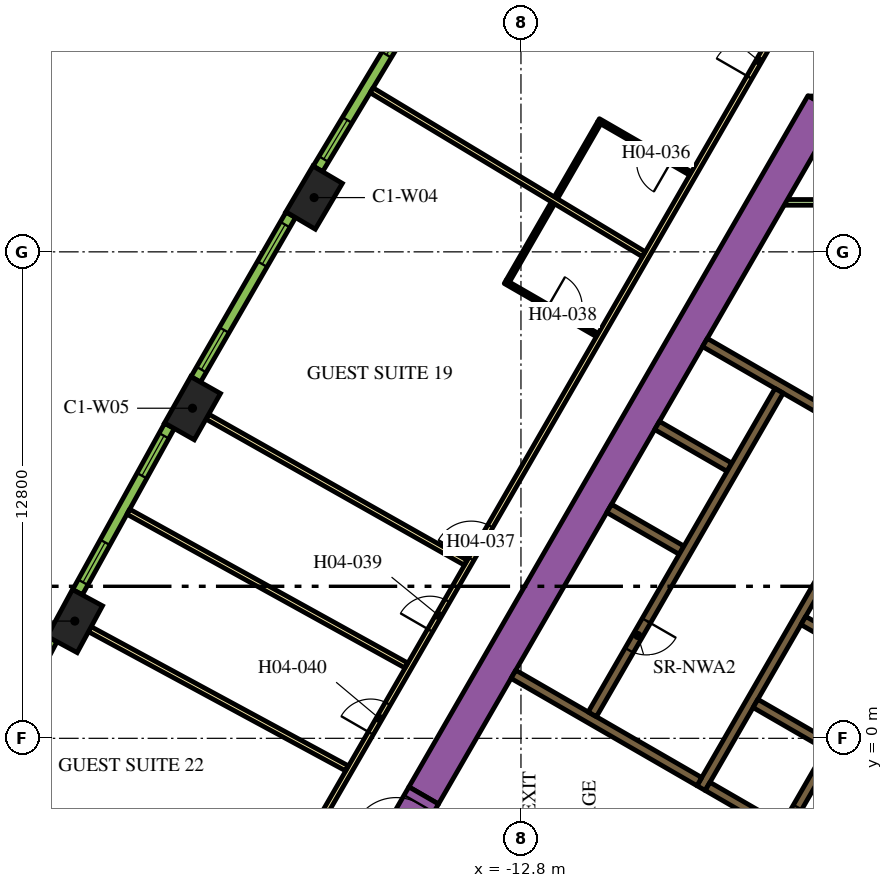
"""IFC4 building model, lengths in metres.
Left out: names, types, materials, properties, quantities, classifications, styles, units other than length and angle.
Written with IfcOpenShell. Run it as: python <this file> out.ifc"""

import sys

from ifc_helpers import new_model, si_unit, direction, frame, frame_2d, origin, origin_2d, place, context, subcontext, project, spatial, polyline, rectangle, outline, extrude, element, fill, save


model = new_model("IFC4")
c1 = context("Model", 3, precision=1e-05, world=origin(), true_north=direction((0.0, 1.0)))
c2 = subcontext(c1, "Body", "Model", "MODEL_VIEW")
j1 = project(units=[si_unit("LENGTHUNIT", "METRE"), si_unit("PLANEANGLEUNIT", "RADIAN")], contexts=[c1])
p1 = place(None, origin())
s1 = spatial("IfcSite", under=j1, at=p1, CompositionType="ELEMENT")
p2 = place(p1, origin())
s2 = spatial("IfcBuilding", under=s1, at=p2, CompositionType="ELEMENT")
p3 = place(p2, frame((0.0, 0.0, 66.6)))
s3 = spatial("IfcBuildingStorey", under=s2, at=p3, CompositionType="ELEMENT", Elevation=66.6)
for number, where, z_axis, x_axis in (
    (1, (-18.243, 14.228, 0.0), (0.0, 0.0, 1.0), (-0.508, -0.861, 0.0)),
    (2, (-21.443, 8.685, 0.0), (0.0, 0.0, 1.0), (-0.492, -0.871, 0.0)),
    (3, (-24.54, 3.085, 0.0), (0.0, 0.0, 1.0), (-0.476, -0.88, 0.0)),
):
    element("IfcColumn", number, at=place(p3, frame(where, z_axis=z_axis, x_axis=x_axis)), inside=s3, PredefinedType="COLUMN", context=c2, shape_type="SweptSolid", body=[
        extrude(rectangle(XDim=1.4, YDim=0.9, at=origin_2d()), origin(), (0.0, 0.0, 1.0), 3.9),
    ])
p4 = place(p3, frame((-15.36, -1.503, 0.0), z_axis=(0.0, 0.0, 1.0), x_axis=(0.50000389221, 0.866023156604, 0.0)))
e4 = element("IfcWall", 4, at=p4, inside=s3, PredefinedType="SOLIDWALL", context=c2, shape_type="SweptSolid", body=[
    extrude(rectangle(XDim=21.0, YDim=0.9, at=frame_2d((10.5, 0.0))), origin(), (0.0, 0.0, 1.0), 3.9),
])
p5 = place(p3, origin())
e5 = element("IfcWall", 5, at=p5, inside=s3, PredefinedType="SOLIDWALL", context=c2, shape_type="SweptSolid", body=[
    extrude(outline(polyline([(-4.215, 16.9), (-4.469, 16.46), (-5.231, 16.9), (-4.215, 16.9)])), origin(), (0.0, 0.0, 1.0), 3.9),
])
p6 = place(p3, frame((-8.06, -1.311, 0.0), z_axis=(0.0, 0.0, 1.0), x_axis=(0.50000273126, 0.866023826885, 0.0)))
e6 = element("IfcWall", 6, at=p6, inside=s3, PredefinedType="SOLIDWALL", context=c2, shape_type="SweptSolid", body=[
    extrude(rectangle(XDim=10.33, YDim=0.25, at=frame_2d((5.165, 0.0))), origin(), (0.0, 0.0, 1.0), 3.9),
])
for number, where, z_axis, x_axis in (
    (7, (-5.369, 3.1, 0.0), (0.0, 0.0, 1.0), (0.866, -0.5, 0.0)),
    (8, (-4.724, -0.182, 0.0), (0.0, 0.0, 1.0), (-0.866, 0.5, 0.0)),
):
    element("IfcWall", number, at=place(p3, frame(where, z_axis=z_axis, x_axis=x_axis)), inside=s3, PredefinedType="SOLIDWALL", context=c2, shape_type="SweptSolid", body=[
        extrude(rectangle(XDim=2.2, YDim=0.25, at=frame_2d((1.1, 0.0))), origin(), (0.0, 0.0, 1.0), 3.9),
    ])
p7 = place(p3, frame((-7.889, -1.265, 0.0), z_axis=(0.0, 0.0, 1.0), x_axis=(0.865986741702, -0.500066958712, 0.0)))
e9 = element("IfcWall", 9, at=p7, inside=s3, PredefinedType="SOLIDWALL", context=c2, shape_type="SweptSolid", body=[
    extrude(rectangle(XDim=1.738, YDim=0.25, at=frame_2d((0.869, 0.0))), origin(), (0.0, 0.0, 1.0), 3.9),
])
p8 = place(p3, frame((-8.106, -1.14, 0.0), z_axis=(0.0, 0.0, 1.0), x_axis=(-0.866000643155, 0.500042884217, 0.0)))
e10 = element("IfcWall", 10, at=p8, inside=s3, PredefinedType="SOLIDWALL", context=c2, shape_type="SweptSolid", body=[
    extrude(rectangle(XDim=5.65, YDim=0.25, at=frame_2d((2.825, 0.0))), origin(), (0.0, 0.0, 1.0), 3.9),
])
for number, where, z_axis, x_axis in (
    (11, (-8.574, 4.95, 0.0), (0.0, 0.0, 1.0), (-0.866, 0.5, 0.0)),
    (12, (-7.314, 7.132, 0.0), (0.0, 0.0, 1.0), (-0.866, 0.5, 0.0)),
):
    element("IfcWall", number, at=place(p3, frame(where, z_axis=z_axis, x_axis=x_axis)), inside=s3, PredefinedType="SOLIDWALL", context=c2, shape_type="SweptSolid", body=[
        extrude(rectangle(XDim=2.2, YDim=0.25, at=frame_2d((1.1, 0.0))), origin(), (0.0, 0.0, 1.0), 3.9),
    ])
p9 = place(p3, frame((-7.959, 10.415, 0.0), z_axis=(0.0, 0.0, 1.0), x_axis=(0.866020958405, -0.500007699544, 0.0)))
e13 = element("IfcWall", 13, at=p9, inside=s3, PredefinedType="SOLIDWALL", context=c2, shape_type="SweptSolid", body=[
    extrude(rectangle(XDim=4.1, YDim=0.25, at=frame_2d((2.05, 0.0))), origin(), (0.0, 0.0, 1.0), 3.9),
])
p10 = place(p3, frame((-5.851, 14.102, 0.0), z_axis=(0.0, 0.0, 1.0), x_axis=(1.0, 0.0, 0.0)))
e14 = element("IfcWall", 14, at=p10, inside=s3, PredefinedType="PARTITIONING", context=c2, shape_type="SweptSolid", body=[
    extrude(rectangle(XDim=1.18, YDim=0.15, at=frame_2d((0.59, 0.0))), origin(), (0.0, 0.0, 1.0), 2.75),
])
p11 = place(p3, frame((-6.008, 9.144, 0.0), z_axis=(0.0, 0.0, 1.0), x_axis=(-0.500006956611, -0.866021387346, 0.0)))
e15 = element("IfcWall", 15, at=p11, inside=s3, PredefinedType="SOLIDWALL", context=c2, shape_type="SweptSolid", body=[
    extrude(rectangle(XDim=9.83, YDim=0.25, at=frame_2d((4.915, 0.0))), origin(), (0.0, 0.0, 1.0), 3.9),
])
p12 = place(p11, frame((6.985, 0.0, 0.0)))
e16 = element("IfcOpeningElement", 16, at=p12, cuts=e15, PredefinedType="OPENING", context=c2, shape_type="SweptSolid", body=[
    extrude(rectangle(XDim=0.9, YDim=2.1, at=frame_2d((0.45, 1.05))), frame((0.0, 0.135, 0.0), z_axis=(0.0, -1.0, 0.0), x_axis=(1.0, 0.0, 0.0)), (0.0, 0.0, 1.0), 0.27),
])
p13 = place(p3, frame((-0.898, 6.194, 0.0), z_axis=(0.0, 0.0, 1.0), x_axis=(-0.499996202215, -0.866027596426, 0.0)))
e17 = element("IfcWall", 17, at=p13, inside=s3, PredefinedType="SOLIDWALL", context=c2, shape_type="SweptSolid", body=[
    extrude(rectangle(XDim=9.83, YDim=0.25, at=frame_2d((4.915, 0.0))), origin(), (0.0, 0.0, 1.0), 3.9),
])
p14 = place(p13, frame((0.585, 0.0, 0.0)))
e18 = element("IfcOpeningElement", 18, at=p14, cuts=e17, PredefinedType="OPENING", context=c2, shape_type="SweptSolid", body=[
    extrude(rectangle(XDim=1.1, YDim=2.1, at=frame_2d((0.55, 1.05))), frame((0.0, 0.135, 0.0), z_axis=(0.0, -1.0, 0.0), x_axis=(1.0, 0.0, 0.0)), (0.0, 0.0, 1.0), 0.27),
])
p15 = place(p13, frame((3.105, 0.0, 0.0)))
e19 = element("IfcOpeningElement", 19, at=p15, cuts=e17, PredefinedType="OPENING", context=c2, shape_type="SweptSolid", body=[
    extrude(rectangle(XDim=1.1, YDim=2.1, at=frame_2d((0.55, 1.05))), frame((0.0, 0.135, 0.0), z_axis=(0.0, -1.0, 0.0), x_axis=(1.0, 0.0, 0.0)), (0.0, 0.0, 1.0), 0.27),
])
p16 = place(p13, frame((5.625, 0.0, 0.0)))
e20 = element("IfcOpeningElement", 20, at=p16, cuts=e17, PredefinedType="OPENING", context=c2, shape_type="SweptSolid", body=[
    extrude(rectangle(XDim=1.1, YDim=2.1, at=frame_2d((0.55, 1.05))), frame((0.0, 0.135, 0.0), z_axis=(0.0, -1.0, 0.0), x_axis=(1.0, 0.0, 0.0)), (0.0, 0.0, 1.0), 0.27),
])
p17 = place(p13, frame((8.145, 0.0, 0.0)))
e21 = element("IfcOpeningElement", 21, at=p17, cuts=e17, PredefinedType="OPENING", context=c2, shape_type="SweptSolid", body=[
    extrude(rectangle(XDim=1.1, YDim=2.1, at=frame_2d((0.55, 1.05))), frame((0.0, 0.135, 0.0), z_axis=(0.0, -1.0, 0.0), x_axis=(1.0, 0.0, 0.0)), (0.0, 0.0, 1.0), 0.27),
])
p18 = place(p3, frame((-16.209, -2.976, 0.0), z_axis=(0.0, 0.0, 1.0), x_axis=(0.499954529098, 0.86605165483, 0.0)))
e22 = element("IfcWall", 22, at=p18, inside=s3, PredefinedType="SOLIDWALL", context=c2, shape_type="SweptSolid", body=[
    extrude(rectangle(XDim=1.7, YDim=0.9, at=frame_2d((0.85, 0.0))), origin(), (0.0, 0.0, 1.0), 3.9),
])
p19 = place(p18, frame((0.25, 0.0, 0.0)))
e23 = element("IfcOpeningElement", 23, at=p19, cuts=e22, PredefinedType="OPENING", context=c2, shape_type="SweptSolid", body=[
    extrude(rectangle(XDim=1.2, YDim=2.1, at=frame_2d((0.6, 1.05))), frame((0.0, 0.46, 0.0), z_axis=(0.0, -1.0, 0.0), x_axis=(1.0, 0.0, 0.0)), (0.0, 0.0, 1.0), 0.92),
])
p20 = place(p3, frame((-19.081, -3.9, 0.0), z_axis=(0.0, 0.0, 1.0), x_axis=(0.499998313975, 0.866026377209, 0.0)))
e24 = element("IfcWall", 24, at=p20, inside=s3, PredefinedType="PARTITIONING", context=c2, shape_type="SweptSolid", body=[
    extrude(rectangle(XDim=25.766, YDim=0.15, at=frame_2d((12.883, 0.0))), origin(), (0.0, 0.0, 1.0), 2.75),
])
p21 = place(p20, frame((24.586, 0.0, 0.0)))
e25 = element("IfcOpeningElement", 25, at=p21, cuts=e24, PredefinedType="OPENING", context=c2, shape_type="SweptSolid", body=[
    extrude(rectangle(XDim=1.0, YDim=2.1, at=frame_2d((0.5, 1.05))), frame((0.0, 0.085, 0.0), z_axis=(0.0, -1.0, 0.0), x_axis=(1.0, 0.0, 0.0)), (0.0, 0.0, 1.0), 0.17),
])
p22 = place(p20, frame((9.948, 0.0, 0.0)))
e26 = element("IfcOpeningElement", 26, at=p22, cuts=e24, PredefinedType="OPENING", context=c2, shape_type="SweptSolid", body=[
    extrude(rectangle(XDim=1.0, YDim=2.1, at=frame_2d((0.5, 1.05))), frame((0.0, 0.085, 0.0), z_axis=(0.0, -1.0, 0.0), x_axis=(1.0, 0.0, 0.0)), (0.0, 0.0, 1.0), 0.17),
])
p23 = place(p20, frame((7.782, 0.0, 0.0)))
e27 = element("IfcOpeningElement", 27, at=p23, cuts=e24, PredefinedType="OPENING", context=c2, shape_type="SweptSolid", body=[
    extrude(rectangle(XDim=0.9, YDim=2.1, at=frame_2d((0.45, 1.05))), frame((0.0, 0.085, 0.0), z_axis=(0.0, -1.0, 0.0), x_axis=(1.0, 0.0, 0.0)), (0.0, 0.0, 1.0), 0.17),
])
p24 = place(p20, frame((4.658, 0.0, 0.0)))
e28 = element("IfcOpeningElement", 28, at=p24, cuts=e24, PredefinedType="OPENING", context=c2, shape_type="SweptSolid", body=[
    extrude(rectangle(XDim=0.9, YDim=2.1, at=frame_2d((0.45, 1.05))), frame((0.0, 0.085, 0.0), z_axis=(0.0, -1.0, 0.0), x_axis=(1.0, 0.0, 0.0)), (0.0, 0.0, 1.0), 0.17),
])
p25 = place(p3, frame((-24.145, 2.871, 0.0), z_axis=(0.0, 0.0, 1.0), x_axis=(0.879551725039, -0.475803281809, 0.0)))
e29 = element("IfcWall", 29, at=p25, inside=s3, PredefinedType="PARTITIONING", context=c2, shape_type="SweptSolid", body=[
    extrude(rectangle(XDim=7.688, YDim=0.15, at=frame_2d((3.844, 0.0))), origin(), (0.0, 0.0, 1.0), 2.75),
])
p26 = place(p3, frame((-23.132, 5.962, 0.0), z_axis=(0.0, 0.0, 1.0), x_axis=(0.875121716713, -0.483902863121, 0.0)))
e30 = element("IfcWall", 30, at=p26, inside=s3, PredefinedType="PARTITIONING", context=c2, shape_type="SweptSolid", body=[
    extrude(rectangle(XDim=8.355, YDim=0.15, at=frame_2d((4.178, 0.0))), origin(), (0.0, 0.0, 1.0), 2.75),
])
p27 = place(p3, frame((-21.052, 8.464, 0.0), z_axis=(0.0, 0.0, 1.0), x_axis=(0.87059371954, -0.492002617368, 0.0)))
e31 = element("IfcWall", 31, at=p27, inside=s3, PredefinedType="PARTITIONING", context=c2, shape_type="SweptSolid", body=[
    extrude(rectangle(XDim=7.803, YDim=0.15, at=frame_2d((3.902, 0.0))), origin(), (0.0, 0.0, 1.0), 2.75),
])
p28 = place(p3, frame((-16.729, 17.052, 0.0), z_axis=(0.0, 0.0, 1.0), x_axis=(0.856630606266, -0.515930232113, 0.0)))
e32 = element("IfcWall", 32, at=p28, inside=s3, PredefinedType="PARTITIONING", context=c2, shape_type="SweptSolid", body=[
    extrude(rectangle(XDim=8.355, YDim=0.15, at=frame_2d((4.178, 0.0))), origin(), (0.0, 0.0, 1.0), 2.75),
])
p29 = place(p3, frame((-8.337, 14.861, 0.0), z_axis=(0.0, 0.0, 1.0), x_axis=(-0.866034573852, 0.49998411664, 0.0)))
e33 = element("IfcWall", 33, at=p29, inside=s3, PredefinedType="PARTITIONING", context=c2, shape_type="SweptSolid", body=[
    extrude(rectangle(XDim=2.8, YDim=0.1, at=frame_2d((1.4, 0.0))), origin(), (0.0, 0.0, 1.0), 2.75),
])
p30 = place(p29, frame((0.6, 0.0, 0.0)))
e34 = element("IfcOpeningElement", 34, at=p30, cuts=e33, PredefinedType="OPENING", context=c2, shape_type="SweptSolid", body=[
    extrude(rectangle(XDim=0.9, YDim=2.1, at=frame_2d((0.45, 1.05))), frame((0.0, 0.06, 0.0), z_axis=(0.0, -1.0, 0.0), x_axis=(1.0, 0.0, 0.0)), (0.0, 0.0, 1.0), 0.12),
])
p31 = place(p3, frame((-10.743, 16.192, 0.0), z_axis=(0.0, 0.0, 1.0), x_axis=(-0.500014167291, -0.866017224141, 0.0)))
e35 = element("IfcWall", 35, at=p31, inside=s3, PredefinedType="PARTITIONING", context=c2, shape_type="SweptSolid", body=[
    extrude(rectangle(XDim=2.27, YDim=0.1, at=frame_2d((1.135, 0.0))), origin(), (0.0, 0.0, 1.0), 2.75),
])
p32 = place(p3, frame((-13.215, 12.011, 0.0), z_axis=(0.0, 0.0, 1.0), x_axis=(0.865996816683, -0.500049511043, 0.0)))
e36 = element("IfcWall", 36, at=p32, inside=s3, PredefinedType="PARTITIONING", context=c2, shape_type="SweptSolid", body=[
    extrude(rectangle(XDim=2.8, YDim=0.1, at=frame_2d((1.4, 0.0))), origin(), (0.0, 0.0, 1.0), 2.75),
])
p33 = place(p32, frame((1.3, 0.0, 0.0)))
e37 = element("IfcOpeningElement", 37, at=p33, cuts=e36, PredefinedType="OPENING", context=c2, shape_type="SweptSolid", body=[
    extrude(rectangle(XDim=0.9, YDim=2.1, at=frame_2d((0.45, 1.05))), frame((0.0, 0.06, 0.0), z_axis=(0.0, -1.0, 0.0), x_axis=(1.0, 0.0, 0.0)), (0.0, 0.0, 1.0), 0.12),
])
p34 = place(p3, frame((-13.147, 12.029, 0.0), z_axis=(0.0, 0.0, 1.0), x_axis=(0.499939447199, 0.866060361138, 0.0)))
e38 = element("IfcWall", 38, at=p34, inside=s3, PredefinedType="PARTITIONING", context=c2, shape_type="SweptSolid", body=[
    extrude(rectangle(XDim=2.37, YDim=0.1, at=frame_2d((1.185, 0.0))), origin(), (0.0, 0.0, 1.0), 2.75),
])
p35 = place(p3, frame((-15.564, 19.267, 0.0), z_axis=(0.0, 0.0, 1.0), x_axis=(-0.515938796285, -0.856625448191, 0.0)))
e39 = element("IfcWall", 39, at=p35, inside=s3, PredefinedType="SOLIDWALL", context=c2, shape_type="SweptSolid", body=[
    extrude(rectangle(XDim=4.998, YDim=0.29, at=frame_2d((2.499, 0.0))), origin(), (0.0, 0.0, 1.0), 3.65),
])
p36 = place(p35, frame((0.297, 0.0, 0.9)))
e40 = element("IfcOpeningElement", 40, at=p36, cuts=e39, PredefinedType="OPENING", context=c2, shape_type="SweptSolid", body=[
    extrude(rectangle(XDim=1.2, YDim=2.15, at=frame_2d((0.6, 1.075))), frame((0.0, 0.155, 0.0), z_axis=(0.0, -1.0, 0.0), x_axis=(1.0, 0.0, 0.0)), (0.0, 0.0, 1.0), 0.31),
])
p37 = place(p35, frame((3.501, 0.0, 0.9)))
e41 = element("IfcOpeningElement", 41, at=p37, cuts=e39, PredefinedType="OPENING", context=c2, shape_type="SweptSolid", body=[
    extrude(rectangle(XDim=1.2, YDim=2.15, at=frame_2d((0.6, 1.075))), frame((0.0, 0.155, 0.0), z_axis=(0.0, -1.0, 0.0), x_axis=(1.0, 0.0, 0.0)), (0.0, 0.0, 1.0), 0.31),
])
p38 = place(p3, frame((-18.858, 13.773, 0.0), z_axis=(0.0, 0.0, 1.0), x_axis=(-0.50002123722, -0.866013142123, 0.0)))
e42 = element("IfcWall", 42, at=p38, inside=s3, PredefinedType="SOLIDWALL", context=c2, shape_type="SweptSolid", body=[
    extrude(rectangle(XDim=4.998, YDim=0.29, at=frame_2d((2.499, 0.0))), origin(), (0.0, 0.0, 1.0), 3.65),
])
p39 = place(p38, frame((0.297, 0.0, 0.9)))
e43 = element("IfcOpeningElement", 43, at=p39, cuts=e42, PredefinedType="OPENING", context=c2, shape_type="SweptSolid", body=[
    extrude(rectangle(XDim=1.2, YDim=2.15, at=frame_2d((0.6, 1.075))), frame((0.0, 0.155, 0.0), z_axis=(0.0, -1.0, 0.0), x_axis=(1.0, 0.0, 0.0)), (0.0, 0.0, 1.0), 0.31),
])
p40 = place(p38, frame((3.501, 0.0, 0.9)))
e44 = element("IfcOpeningElement", 44, at=p40, cuts=e42, PredefinedType="OPENING", context=c2, shape_type="SweptSolid", body=[
    extrude(rectangle(XDim=1.2, YDim=2.15, at=frame_2d((0.6, 1.075))), frame((0.0, 0.155, 0.0), z_axis=(0.0, -1.0, 0.0), x_axis=(1.0, 0.0, 0.0)), (0.0, 0.0, 1.0), 0.31),
])
p41 = place(p3, frame((-22.05, 8.22, 0.0), z_axis=(0.0, 0.0, 1.0), x_axis=(-0.483912572871, -0.875116347589, 0.0)))
e45 = element("IfcWall", 45, at=p41, inside=s3, PredefinedType="SOLIDWALL", context=c2, shape_type="SweptSolid", body=[
    extrude(rectangle(XDim=4.998, YDim=0.29, at=frame_2d((2.499, 0.0))), origin(), (0.0, 0.0, 1.0), 3.65),
])
p42 = place(p41, frame((0.297, 0.0, 0.9)))
e46 = element("IfcOpeningElement", 46, at=p42, cuts=e45, PredefinedType="OPENING", context=c2, shape_type="SweptSolid", body=[
    extrude(rectangle(XDim=1.2, YDim=2.15, at=frame_2d((0.6, 1.075))), frame((0.0, 0.155, 0.0), z_axis=(0.0, -1.0, 0.0), x_axis=(1.0, 0.0, 0.0)), (0.0, 0.0, 1.0), 0.31),
])
p43 = place(p41, frame((3.501, 0.0, 0.9)))
e47 = element("IfcOpeningElement", 47, at=p43, cuts=e45, PredefinedType="OPENING", context=c2, shape_type="SweptSolid", body=[
    extrude(rectangle(XDim=1.2, YDim=2.15, at=frame_2d((0.6, 1.075))), frame((0.0, 0.155, 0.0), z_axis=(0.0, -1.0, 0.0), x_axis=(1.0, 0.0, 0.0)), (0.0, 0.0, 1.0), 0.31),
])
p44 = place(p3, frame((-25.138, 2.608, 0.0), z_axis=(0.0, 0.0, 1.0), x_axis=(-0.467629620899, -0.883924509026, 0.0)))
e48 = element("IfcWall", 48, at=p44, inside=s3, PredefinedType="SOLIDWALL", context=c2, shape_type="SweptSolid", body=[
    extrude(rectangle(XDim=4.998, YDim=0.29, at=frame_2d((2.499, 0.0))), origin(), (0.0, 0.0, 1.0), 3.65),
])
p45 = place(p44, frame((0.297, 0.0, 0.9)))
e49 = element("IfcOpeningElement", 49, at=p45, cuts=e48, PredefinedType="OPENING", context=c2, shape_type="SweptSolid", body=[
    extrude(rectangle(XDim=1.2, YDim=2.15, at=frame_2d((0.6, 1.075))), frame((0.0, 0.155, 0.0), z_axis=(0.0, -1.0, 0.0), x_axis=(1.0, 0.0, 0.0)), (0.0, 0.0, 1.0), 0.31),
])
p46 = place(p44, frame((3.501, 0.0, 0.9)))
e50 = element("IfcOpeningElement", 50, at=p46, cuts=e48, PredefinedType="OPENING", context=c2, shape_type="SweptSolid", body=[
    extrude(rectangle(XDim=1.2, YDim=2.15, at=frame_2d((0.6, 1.075))), frame((0.0, 0.155, 0.0), z_axis=(0.0, -1.0, 0.0), x_axis=(1.0, 0.0, 0.0)), (0.0, 0.0, 1.0), 0.31),
])
p47 = place(p12, origin())
e51 = element("IfcDoor", 51, at=p47, inside=s3, OperationType="SINGLE_SWING_LEFT", PredefinedType="DOOR", context=c2, shape_type="SweptSolid", body=[
    extrude(rectangle(XDim=0.9, YDim=2.1, at=frame_2d((0.45, 1.05))), frame((0.0, 0.025, 0.0), z_axis=(0.0, -1.0, 0.0), x_axis=(1.0, 0.0, 0.0)), (0.0, 0.0, 1.0), 0.05),
])
fill(e16, e51)
p48 = place(p17, origin())
e52 = element("IfcDoor", 52, at=p48, inside=s3, OperationType="DOUBLE_DOOR_SLIDING", PredefinedType="DOOR", context=c2, shape_type="SweptSolid", body=[
    extrude(rectangle(XDim=1.1, YDim=2.1, at=frame_2d((0.55, 1.05))), frame((0.0, 0.025, 0.0), z_axis=(0.0, -1.0, 0.0), x_axis=(1.0, 0.0, 0.0)), (0.0, 0.0, 1.0), 0.05),
])
fill(e21, e52)
p49 = place(p19, origin())
e53 = element("IfcDoor", 53, at=p49, inside=s3, OperationType="SINGLE_SWING_LEFT", PredefinedType="DOOR", context=c2, shape_type="SweptSolid", body=[
    extrude(rectangle(XDim=1.2, YDim=2.1, at=frame_2d((0.6, 1.05))), frame((0.0, 0.025, 0.0), z_axis=(0.0, -1.0, 0.0), x_axis=(1.0, 0.0, 0.0)), (0.0, 0.0, 1.0), 0.05),
])
fill(e23, e53)
p50 = place(p21, origin())
e54 = element("IfcDoor", 54, at=p50, inside=s3, OperationType="SINGLE_SWING_RIGHT", PredefinedType="DOOR", context=c2, shape_type="SweptSolid", body=[
    extrude(rectangle(XDim=1.0, YDim=2.1, at=frame_2d((0.5, 1.05))), frame((0.0, 0.025, 0.0), z_axis=(0.0, -1.0, 0.0), x_axis=(1.0, 0.0, 0.0)), (0.0, 0.0, 1.0), 0.05),
])
fill(e25, e54)
p51 = place(p30, origin())
e55 = element("IfcDoor", 55, at=p51, inside=s3, OperationType="SINGLE_SWING_RIGHT", PredefinedType="DOOR", context=c2, shape_type="SweptSolid", body=[
    extrude(rectangle(XDim=0.9, YDim=2.1, at=frame_2d((0.45, 1.05))), frame((0.0, 0.025, 0.0), z_axis=(0.0, -1.0, 0.0), x_axis=(1.0, 0.0, 0.0)), (0.0, 0.0, 1.0), 0.05),
])
fill(e34, e55)
p52 = place(p22, origin())
e56 = element("IfcDoor", 56, at=p52, inside=s3, OperationType="SINGLE_SWING_LEFT", PredefinedType="DOOR", context=c2, shape_type="SweptSolid", body=[
    extrude(rectangle(XDim=1.0, YDim=2.1, at=frame_2d((0.5, 1.05))), frame((0.0, 0.025, 0.0), z_axis=(0.0, -1.0, 0.0), x_axis=(1.0, 0.0, 0.0)), (0.0, 0.0, 1.0), 0.05),
])
fill(e26, e56)
p53 = place(p33, origin())
e57 = element("IfcDoor", 57, at=p53, inside=s3, OperationType="SINGLE_SWING_LEFT", PredefinedType="DOOR", context=c2, shape_type="SweptSolid", body=[
    extrude(rectangle(XDim=0.9, YDim=2.1, at=frame_2d((0.45, 1.05))), frame((0.0, 0.025, 0.0), z_axis=(0.0, -1.0, 0.0), x_axis=(1.0, 0.0, 0.0)), (0.0, 0.0, 1.0), 0.05),
])
fill(e37, e57)
p54 = place(p23, origin())
e58 = element("IfcDoor", 58, at=p54, inside=s3, OperationType="SINGLE_SWING_RIGHT", PredefinedType="DOOR", context=c2, shape_type="SweptSolid", body=[
    extrude(rectangle(XDim=0.9, YDim=2.1, at=frame_2d((0.45, 1.05))), frame((0.0, 0.025, 0.0), z_axis=(0.0, -1.0, 0.0), x_axis=(1.0, 0.0, 0.0)), (0.0, 0.0, 1.0), 0.05),
])
fill(e27, e58)
p55 = place(p24, origin())
e59 = element("IfcDoor", 59, at=p55, inside=s3, OperationType="SINGLE_SWING_LEFT", PredefinedType="DOOR", context=c2, shape_type="SweptSolid", body=[
    extrude(rectangle(XDim=0.9, YDim=2.1, at=frame_2d((0.45, 1.05))), frame((0.0, 0.025, 0.0), z_axis=(0.0, -1.0, 0.0), x_axis=(1.0, 0.0, 0.0)), (0.0, 0.0, 1.0), 0.05),
])
fill(e28, e59)
p56 = place(p36, origin())
e60 = element("IfcWindow", 60, at=p56, inside=s3, PartitioningType="DOUBLE_PANEL_VERTICAL", PredefinedType="WINDOW", context=c2, shape_type="SweptSolid", body=[
    extrude(rectangle(XDim=1.2, YDim=2.15, at=frame_2d((0.6, 1.075))), frame((0.0, 0.015, 0.0), z_axis=(0.0, -1.0, 0.0), x_axis=(1.0, 0.0, 0.0)), (0.0, 0.0, 1.0), 0.06),
])
fill(e40, e60)
p57 = place(p37, origin())
e61 = element("IfcWindow", 61, at=p57, inside=s3, PartitioningType="DOUBLE_PANEL_VERTICAL", PredefinedType="WINDOW", context=c2, shape_type="SweptSolid", body=[
    extrude(rectangle(XDim=1.2, YDim=2.15, at=frame_2d((0.6, 1.075))), frame((0.0, 0.015, 0.0), z_axis=(0.0, -1.0, 0.0), x_axis=(1.0, 0.0, 0.0)), (0.0, 0.0, 1.0), 0.06),
])
fill(e41, e61)
p58 = place(p39, origin())
e62 = element("IfcWindow", 62, at=p58, inside=s3, PartitioningType="DOUBLE_PANEL_VERTICAL", PredefinedType="WINDOW", context=c2, shape_type="SweptSolid", body=[
    extrude(rectangle(XDim=1.2, YDim=2.15, at=frame_2d((0.6, 1.075))), frame((0.0, 0.015, 0.0), z_axis=(0.0, -1.0, 0.0), x_axis=(1.0, 0.0, 0.0)), (0.0, 0.0, 1.0), 0.06),
])
fill(e43, e62)
p59 = place(p40, origin())
e63 = element("IfcWindow", 63, at=p59, inside=s3, PartitioningType="DOUBLE_PANEL_VERTICAL", PredefinedType="WINDOW", context=c2, shape_type="SweptSolid", body=[
    extrude(rectangle(XDim=1.2, YDim=2.15, at=frame_2d((0.6, 1.075))), frame((0.0, 0.015, 0.0), z_axis=(0.0, -1.0, 0.0), x_axis=(1.0, 0.0, 0.0)), (0.0, 0.0, 1.0), 0.06),
])
fill(e44, e63)
p60 = place(p42, origin())
e64 = element("IfcWindow", 64, at=p60, inside=s3, PartitioningType="DOUBLE_PANEL_VERTICAL", PredefinedType="WINDOW", context=c2, shape_type="SweptSolid", body=[
    extrude(rectangle(XDim=1.2, YDim=2.15, at=frame_2d((0.6, 1.075))), frame((0.0, 0.015, 0.0), z_axis=(0.0, -1.0, 0.0), x_axis=(1.0, 0.0, 0.0)), (0.0, 0.0, 1.0), 0.06),
])
fill(e46, e64)
p61 = place(p43, origin())
e65 = element("IfcWindow", 65, at=p61, inside=s3, PartitioningType="DOUBLE_PANEL_VERTICAL", PredefinedType="WINDOW", context=c2, shape_type="SweptSolid", body=[
    extrude(rectangle(XDim=1.2, YDim=2.15, at=frame_2d((0.6, 1.075))), frame((0.0, 0.015, 0.0), z_axis=(0.0, -1.0, 0.0), x_axis=(1.0, 0.0, 0.0)), (0.0, 0.0, 1.0), 0.06),
])
fill(e47, e65)
save(model, sys.argv[1])
